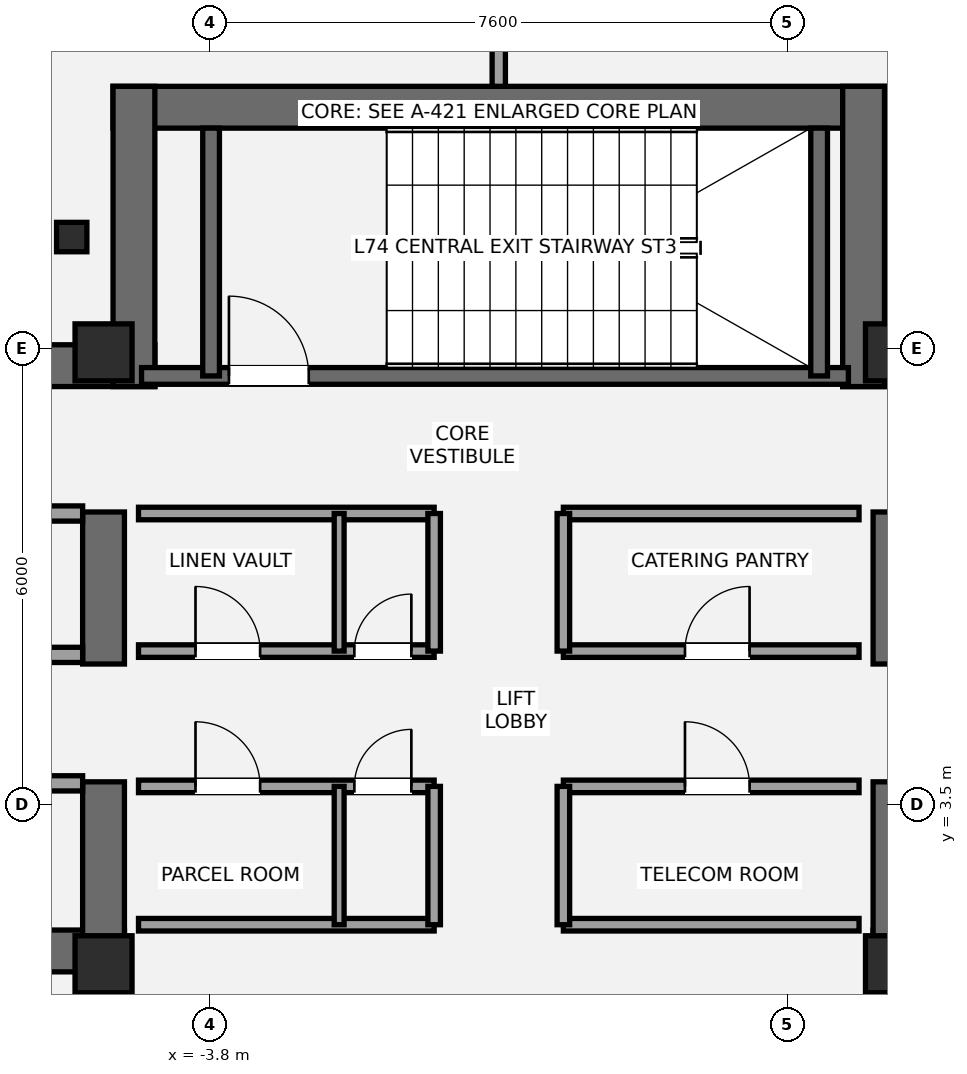
"""IFC4 building model, lengths in metres.
Left out: names, types, materials, properties, quantities, classifications, styles, units other than length and angle.
Written with IfcOpenShell. Run it as: python <this file> out.ifc"""

import sys

from ifc_helpers import new_model, si_unit, direction, frame, frame_2d, origin, origin_2d, place, context, subcontext, project, spatial, rectangle, i_section, extrude, element, fill, save


model = new_model("IFC4")
c1 = context("Model", 3, precision=1e-05, world=origin(), true_north=direction((0.0, 1.0)))
c2 = subcontext(c1, "Body", "Model", "MODEL_VIEW")
j1 = project(units=[si_unit("LENGTHUNIT", "METRE"), si_unit("PLANEANGLEUNIT", "RADIAN")], contexts=[c1])
p1 = place(None, origin())
s1 = spatial("IfcSite", under=j1, at=p1, CompositionType="ELEMENT")
p2 = place(p1, origin())
s2 = spatial("IfcBuilding", under=s1, at=p2, CompositionType="ELEMENT")
p3 = place(p2, frame((0.0, 0.0, 260.4)))
s3 = spatial("IfcBuildingStorey", under=s2, at=p3, CompositionType="ELEMENT", Elevation=260.4)
p4 = place(p3, frame((-13.7, 9.275, 0.0), z_axis=(0.0, 0.0, 1.0), x_axis=(1.0, 0.0, 0.0)))
e1 = element("IfcWall", 1, at=p4, inside=s3, PredefinedType="SHEAR", context=c2, shape_type="SweptSolid", body=[
    extrude(rectangle(XDim=9.175, YDim=0.55, at=frame_2d((4.587, 0.0))), origin(), (0.0, 0.0, 1.0), 4.4),
])
p5 = place(p3, frame((-4.925, 1.575, 0.0), z_axis=(0.0, 0.0, 1.0), x_axis=(-1.0, 0.0, 0.0)))
e2 = element("IfcWall", 2, at=p5, inside=s3, PredefinedType="SHEAR", context=c2, shape_type="SweptSolid", body=[
    extrude(rectangle(XDim=8.775, YDim=0.55, at=frame_2d((4.387, 0.0))), origin(), (0.0, 0.0, 1.0), 4.4),
])
p6 = place(p5, frame((5.375, 0.0, 0.0)))
e3 = element("IfcOpeningElement", 3, at=p6, cuts=e2, PredefinedType="OPENING", context=c2, shape_type="SweptSolid", body=[
    extrude(rectangle(XDim=1.05, YDim=2.15, at=frame_2d((0.525, 1.075))), frame((0.0, 0.285, 0.0), z_axis=(0.0, -1.0, 0.0), x_axis=(1.0, 0.0, 0.0)), (0.0, 0.0, 1.0), 0.57),
])
p7 = place(p5, frame((3.705, 0.0, 0.0)))
e4 = element("IfcOpeningElement", 4, at=p7, cuts=e2, PredefinedType="OPENING", context=c2, shape_type="SweptSolid", body=[
    extrude(rectangle(XDim=1.1, YDim=2.2, at=frame_2d((0.55, 1.1))), frame((0.0, 0.285, 0.0), z_axis=(0.0, -1.0, 0.0), x_axis=(1.0, 0.0, 0.0)), (0.0, 0.0, 1.0), 0.57),
])
p8 = place(p3, frame((-5.2, 1.3, 0.0), z_axis=(0.0, 0.0, 1.0), x_axis=(0.0, 1.0, 0.0)))
e5 = element("IfcWall", 5, at=p8, inside=s3, PredefinedType="SHEAR", context=c2, shape_type="SweptSolid", body=[
    extrude(rectangle(XDim=2.5, YDim=0.55, at=frame_2d((1.25, 0.0))), origin(), (0.0, 0.0, 1.0), 4.4),
])
p9 = place(p3, frame((-5.2, 5.35, 0.0), z_axis=(0.0, 0.0, 1.0), x_axis=(0.0, 1.0, 0.0)))
e6 = element("IfcWall", 6, at=p9, inside=s3, PredefinedType="SHEAR", context=c2, shape_type="SweptSolid", body=[
    extrude(rectangle(XDim=2.0, YDim=0.55, at=frame_2d((1.0, 0.0))), origin(), (0.0, 0.0, 1.0), 4.4),
])
p10 = place(p3, frame((4.525, 9.275, 0.0), z_axis=(0.0, 0.0, 1.0), x_axis=(1.0, 0.0, 0.0)))
e7 = element("IfcWall", 7, at=p10, inside=s3, PredefinedType="SHEAR", context=c2, shape_type="SweptSolid", body=[
    extrude(rectangle(XDim=9.175, YDim=0.55, at=frame_2d((4.587, 0.0))), origin(), (0.0, 0.0, 1.0), 4.4),
])
p11 = place(p3, frame((13.7, 1.575, 0.0), z_axis=(0.0, 0.0, 1.0), x_axis=(-1.0, 0.0, 0.0)))
e8 = element("IfcWall", 8, at=p11, inside=s3, PredefinedType="SHEAR", context=c2, shape_type="SweptSolid", body=[
    extrude(rectangle(XDim=8.775, YDim=0.55, at=frame_2d((4.387, 0.0))), origin(), (0.0, 0.0, 1.0), 4.4),
])
p12 = place(p11, frame((2.35, 0.0, 0.0)))
e9 = element("IfcOpeningElement", 9, at=p12, cuts=e8, PredefinedType="OPENING", context=c2, shape_type="SweptSolid", body=[
    extrude(rectangle(XDim=1.05, YDim=2.15, at=frame_2d((0.525, 1.075))), frame((0.0, 0.285, 0.0), z_axis=(0.0, -1.0, 0.0), x_axis=(1.0, 0.0, 0.0)), (0.0, 0.0, 1.0), 0.57),
])
p13 = place(p11, frame((4.35, 0.0, 0.0)))
e10 = element("IfcOpeningElement", 10, at=p13, cuts=e8, PredefinedType="OPENING", context=c2, shape_type="SweptSolid", body=[
    extrude(rectangle(XDim=1.1, YDim=2.2, at=frame_2d((0.55, 1.1))), frame((0.0, 0.285, 0.0), z_axis=(0.0, -1.0, 0.0), x_axis=(1.0, 0.0, 0.0)), (0.0, 0.0, 1.0), 0.57),
])
p14 = place(p3, frame((5.2, 1.3, 0.0), z_axis=(0.0, 0.0, 1.0), x_axis=(0.0, 1.0, 0.0)))
e11 = element("IfcWall", 11, at=p14, inside=s3, PredefinedType="SHEAR", context=c2, shape_type="SweptSolid", body=[
    extrude(rectangle(XDim=2.5, YDim=0.55, at=frame_2d((1.25, 0.0))), origin(), (0.0, 0.0, 1.0), 4.4),
])
p15 = place(p3, frame((5.2, 5.35, 0.0), z_axis=(0.0, 0.0, 1.0), x_axis=(0.0, 1.0, 0.0)))
e12 = element("IfcWall", 12, at=p15, inside=s3, PredefinedType="SHEAR", context=c2, shape_type="SweptSolid", body=[
    extrude(rectangle(XDim=2.0, YDim=0.55, at=frame_2d((1.0, 0.0))), origin(), (0.0, 0.0, 1.0), 4.4),
])
p16 = place(p3, frame((-5.075, 12.675, 0.0), z_axis=(0.0, 0.0, 1.0), x_axis=(1.0, 0.0, 0.0)))
e13 = element("IfcWall", 13, at=p16, inside=s3, PredefinedType="SHEAR", context=c2, shape_type="SweptSolid", body=[
    extrude(rectangle(XDim=10.15, YDim=0.55, at=frame_2d((5.075, 0.0))), origin(), (0.0, 0.0, 1.0), 4.4),
])
for number, where, z_axis, x_axis in (
    (14, (-4.8, 9.0, 0.0), (0.0, 0.0, 1.0), (0.0, 1.0, 0.0)),
    (15, (4.8, 9.0, 0.0), (0.0, 0.0, 1.0), (0.0, 1.0, 0.0)),
):
    element("IfcWall", number, at=place(p3, frame(where, z_axis=z_axis, x_axis=x_axis)), inside=s3, PredefinedType="SHEAR", context=c2, shape_type="SweptSolid", body=[
        extrude(rectangle(XDim=3.95, YDim=0.55, at=frame_2d((1.975, 0.0))), origin(), (0.0, 0.0, 1.0), 4.4),
    ])
p17 = place(p3, frame((-4.7, 9.14, 0.0), z_axis=(0.0, 0.0, 1.0), x_axis=(1.0, 0.0, 0.0)))
e16 = element("IfcWall", 16, at=p17, inside=s3, PredefinedType="SHEAR", context=c2, shape_type="SweptSolid", body=[
    extrude(rectangle(XDim=9.3, YDim=0.22, at=frame_2d((4.65, 0.0))), origin(), (0.0, 0.0, 1.0), 4.4),
])
p18 = place(p17, frame((1.15, 0.0, 0.0)))
e17 = element("IfcOpeningElement", 17, at=p18, cuts=e16, PredefinedType="OPENING", context=c2, shape_type="SweptSolid", body=[
    extrude(rectangle(XDim=1.05, YDim=2.15, at=frame_2d((0.525, 1.075))), frame((0.0, 0.12, 0.0), z_axis=(0.0, -1.0, 0.0), x_axis=(1.0, 0.0, 0.0)), (0.0, 0.0, 1.0), 0.24),
])
for number, where, z_axis, x_axis in (
    (18, (-3.785, 9.14, 0.0), (0.0, 0.0, 1.0), (0.0, 1.0, 0.0)),
    (19, (4.215, 9.14, 0.0), (0.0, 0.0, 1.0), (0.0, 1.0, 0.0)),
):
    element("IfcWall", number, at=place(p3, frame(where, z_axis=z_axis, x_axis=x_axis)), inside=s3, PredefinedType="SHEAR", context=c2, shape_type="SweptSolid", body=[
        extrude(rectangle(XDim=3.26, YDim=0.22, at=frame_2d((1.63, 0.0))), origin(), (0.0, 0.0, 1.0), 4.4),
    ])
for number, where, z_axis, x_axis in (
    (20, (-5.2, 1.4, 0.0), (0.0, 0.0, 1.0), (1.0, 0.0, 0.0)),
    (21, (-5.2, 9.45, 0.0), (0.0, 0.0, 1.0), (1.0, 0.0, 0.0)),
    (22, (5.2, 1.4, 0.0), (0.0, 0.0, 1.0), (1.0, 0.0, 0.0)),
    (23, (5.2, 9.45, 0.0), (0.0, 0.0, 1.0), (1.0, 0.0, 0.0)),
):
    element("IfcColumn", number, at=place(p3, frame(where, z_axis=z_axis, x_axis=x_axis)), inside=s3, PredefinedType="PILASTER", context=c2, shape_type="SweptSolid", body=[
        extrude(rectangle(XDim=0.75, YDim=0.75, at=origin_2d()), origin(), (0.0, 0.0, 1.0), 4.4),
    ])
p19 = place(p3, frame((-5.619, 10.967, 0.0), z_axis=(0.0, 0.0, 1.0), x_axis=(1.0, 0.0, 0.0)))
e24 = element("IfcColumn", 24, at=p19, inside=s3, PredefinedType="COLUMN", context=c2, shape_type="SweptSolid", body=[
    extrude(i_section(OverallWidth=0.399, OverallDepth=0.387, WebThickness=0.021, FlangeThickness=0.033, at=origin_2d()), origin(), (0.0, 0.0, 1.0), 4.4),
])
p20 = place(p3, frame((-4.95, -2.15, 0.0), z_axis=(0.0, 0.0, 1.0), x_axis=(0.0, 1.0, 0.0)))
e25 = element("IfcWall", 25, at=p20, inside=s3, PredefinedType="SOLIDWALL", context=c2, shape_type="SweptSolid", body=[
    extrude(rectangle(XDim=3.5, YDim=0.2, at=frame_2d((1.75, 0.0))), origin(), (0.0, 0.0, 1.0), 3.633),
])
p21 = place(p20, frame((0.95, 0.0, 0.0)))
e26 = element("IfcOpeningElement", 26, at=p21, cuts=e25, PredefinedType="OPENING", context=c2, shape_type="SweptSolid", body=[
    extrude(rectangle(XDim=0.75, YDim=2.1, at=frame_2d((0.375, 1.05))), frame((0.0, 0.11, 0.0), z_axis=(0.0, -1.0, 0.0), x_axis=(1.0, 0.0, 0.0)), (0.0, 0.0, 1.0), 0.22),
])
p22 = place(p3, frame((4.95, -2.15, 0.0), z_axis=(0.0, 0.0, 1.0), x_axis=(0.0, 1.0, 0.0)))
e27 = element("IfcWall", 27, at=p22, inside=s3, PredefinedType="SOLIDWALL", context=c2, shape_type="SweptSolid", body=[
    extrude(rectangle(XDim=3.5, YDim=0.2, at=frame_2d((1.75, 0.0))), origin(), (0.0, 0.0, 1.0), 2.37),
])
p23 = place(p22, frame((0.95, 0.0, 0.0)))
e28 = element("IfcOpeningElement", 28, at=p23, cuts=e27, PredefinedType="OPENING", context=c2, shape_type="SweptSolid", body=[
    extrude(rectangle(XDim=0.75, YDim=2.1, at=frame_2d((0.375, 1.05))), frame((0.0, 0.11, 0.0), z_axis=(0.0, -1.0, 0.0), x_axis=(1.0, 0.0, 0.0)), (0.0, 0.0, 1.0), 0.22),
])
p24 = place(p3, frame((-9.78, 3.78, 0.0), z_axis=(0.0, 0.0, 1.0), x_axis=(1.0, 0.0, 0.0)))
e29 = element("IfcWall", 29, at=p24, inside=s3, PredefinedType="SOLIDWALL", context=c2, shape_type="SweptSolid", body=[
    extrude(rectangle(XDim=4.305, YDim=0.2, at=frame_2d((2.152, 0.0))), origin(), (0.0, 0.0, 1.0), 4.18),
])
p25 = place(p24, frame((2.78, 0.0, 0.0)))
e30 = element("IfcOpeningElement", 30, at=p25, cuts=e29, PredefinedType="OPENING", context=c2, shape_type="SweptSolid", body=[
    extrude(rectangle(XDim=0.85, YDim=2.1, at=frame_2d((0.425, 1.05))), frame((0.0, 0.11, 0.0), z_axis=(0.0, -1.0, 0.0), x_axis=(1.0, 0.0, 0.0)), (0.0, 0.0, 1.0), 0.22),
])
p26 = place(p3, frame((-9.78, 5.47, 0.0), z_axis=(0.0, 0.0, 1.0), x_axis=(1.0, 0.0, 0.0)))
e31 = element("IfcWall", 31, at=p26, inside=s3, PredefinedType="SOLIDWALL", context=c2, shape_type="SweptSolid", body=[
    extrude(rectangle(XDim=4.305, YDim=0.2, at=frame_2d((2.152, 0.0))), origin(), (0.0, 0.0, 1.0), 4.18),
])
p27 = place(p26, frame((2.78, 0.0, 0.0)))
e32 = element("IfcOpeningElement", 32, at=p27, cuts=e31, PredefinedType="OPENING", context=c2, shape_type="SweptSolid", body=[
    extrude(rectangle(XDim=0.85, YDim=2.1, at=frame_2d((0.425, 1.05))), frame((0.0, 0.11, 0.0), z_axis=(0.0, -1.0, 0.0), x_axis=(1.0, 0.0, 0.0)), (0.0, 0.0, 1.0), 0.22),
])
p28 = place(p3, frame((-9.78, 7.33, 0.0), z_axis=(0.0, 0.0, 1.0), x_axis=(1.0, 0.0, 0.0)))
e33 = element("IfcWall", 33, at=p28, inside=s3, PredefinedType="SOLIDWALL", context=c2, shape_type="SweptSolid", body=[
    extrude(rectangle(XDim=4.305, YDim=0.2, at=frame_2d((2.152, 0.0))), origin(), (0.0, 0.0, 1.0), 4.18),
])
p29 = place(p3, frame((-4.74, 1.92, 0.0), z_axis=(0.0, 0.0, 1.0), x_axis=(1.0, 0.0, 0.0)))
e34 = element("IfcWall", 34, at=p29, inside=s3, PredefinedType="PARTITIONING", context=c2, shape_type="SweptSolid", body=[
    extrude(rectangle(XDim=3.89, YDim=0.165, at=frame_2d((1.945, 0.0))), origin(), (0.0, 0.0, 1.0), 3.32),
])
p30 = place(p3, frame((-4.74, 3.74, 0.0), z_axis=(0.0, 0.0, 1.0), x_axis=(1.0, 0.0, 0.0)))
e35 = element("IfcWall", 35, at=p30, inside=s3, PredefinedType="PARTITIONING", context=c2, shape_type="SweptSolid", body=[
    extrude(rectangle(XDim=3.89, YDim=0.165, at=frame_2d((1.945, 0.0))), origin(), (0.0, 0.0, 1.0), 4.18),
])
p31 = place(p30, frame((0.75, 0.0, 0.0)))
e36 = element("IfcOpeningElement", 36, at=p31, cuts=e35, PredefinedType="OPENING", context=c2, shape_type="SweptSolid", body=[
    extrude(rectangle(XDim=0.85, YDim=2.1, at=frame_2d((0.425, 1.05))), frame((0.0, 0.093, 0.0), z_axis=(0.0, -1.0, 0.0), x_axis=(1.0, 0.0, 0.0)), (0.0, 0.0, 1.0), 0.185),
])
p32 = place(p30, frame((2.84, 0.0, 0.0)))
e37 = element("IfcOpeningElement", 37, at=p32, cuts=e35, PredefinedType="OPENING", context=c2, shape_type="SweptSolid", body=[
    extrude(rectangle(XDim=0.75, YDim=2.1, at=frame_2d((0.375, 1.05))), frame((0.0, 0.093, 0.0), z_axis=(0.0, -1.0, 0.0), x_axis=(1.0, 0.0, 0.0)), (0.0, 0.0, 1.0), 0.185),
])
p33 = place(p3, frame((-0.85, 1.92, 0.0), z_axis=(0.0, 0.0, 1.0), x_axis=(0.0, 1.0, 0.0)))
e38 = element("IfcWall", 38, at=p33, inside=s3, PredefinedType="PARTITIONING", context=c2, shape_type="SweptSolid", body=[
    extrude(rectangle(XDim=1.82, YDim=0.165, at=frame_2d((0.91, 0.0))), origin(), (0.0, 0.0, 1.0), 4.18),
])
p34 = place(p3, frame((0.85, 1.92, 0.0), z_axis=(0.0, 0.0, 1.0), x_axis=(1.0, 0.0, 0.0)))
e39 = element("IfcWall", 39, at=p34, inside=s3, PredefinedType="PARTITIONING", context=c2, shape_type="SweptSolid", body=[
    extrude(rectangle(XDim=3.89, YDim=0.165, at=frame_2d((1.945, 0.0))), origin(), (0.0, 0.0, 1.0), 3.32),
])
p35 = place(p3, frame((0.85, 3.74, 0.0), z_axis=(0.0, 0.0, 1.0), x_axis=(1.0, 0.0, 0.0)))
e40 = element("IfcWall", 40, at=p35, inside=s3, PredefinedType="PARTITIONING", context=c2, shape_type="SweptSolid", body=[
    extrude(rectangle(XDim=3.89, YDim=0.165, at=frame_2d((1.945, 0.0))), origin(), (0.0, 0.0, 1.0), 4.18),
])
p36 = place(p35, frame((1.6, 0.0, 0.0)))
e41 = element("IfcOpeningElement", 41, at=p36, cuts=e40, PredefinedType="OPENING", context=c2, shape_type="SweptSolid", body=[
    extrude(rectangle(XDim=0.85, YDim=2.1, at=frame_2d((0.425, 1.05))), frame((0.0, 0.093, 0.0), z_axis=(0.0, -1.0, 0.0), x_axis=(1.0, 0.0, 0.0)), (0.0, 0.0, 1.0), 0.185),
])
p37 = place(p3, frame((0.85, 1.92, 0.0), z_axis=(0.0, 0.0, 1.0), x_axis=(0.0, 1.0, 0.0)))
e42 = element("IfcWall", 42, at=p37, inside=s3, PredefinedType="PARTITIONING", context=c2, shape_type="SweptSolid", body=[
    extrude(rectangle(XDim=1.82, YDim=0.165, at=frame_2d((0.91, 0.0))), origin(), (0.0, 0.0, 1.0), 4.18),
])
p38 = place(p3, frame((-2.1, 1.92, 0.0), z_axis=(0.0, 0.0, 1.0), x_axis=(0.0, 1.0, 0.0)))
e43 = element("IfcWall", 43, at=p38, inside=s3, PredefinedType="PARTITIONING", context=c2, shape_type="SweptSolid", body=[
    extrude(rectangle(XDim=1.82, YDim=0.13, at=frame_2d((0.91, 0.0))), origin(), (0.0, 0.0, 1.0), 4.18),
])
p39 = place(p3, frame((-4.74, 5.52, 0.0), z_axis=(0.0, 0.0, 1.0), x_axis=(1.0, 0.0, 0.0)))
e44 = element("IfcWall", 44, at=p39, inside=s3, PredefinedType="PARTITIONING", context=c2, shape_type="SweptSolid", body=[
    extrude(rectangle(XDim=3.89, YDim=0.165, at=frame_2d((1.945, 0.0))), origin(), (0.0, 0.0, 1.0), 4.18),
])
p40 = place(p39, frame((0.75, 0.0, 0.0)))
e45 = element("IfcOpeningElement", 45, at=p40, cuts=e44, PredefinedType="OPENING", context=c2, shape_type="SweptSolid", body=[
    extrude(rectangle(XDim=0.85, YDim=2.1, at=frame_2d((0.425, 1.05))), frame((0.0, 0.093, 0.0), z_axis=(0.0, -1.0, 0.0), x_axis=(1.0, 0.0, 0.0)), (0.0, 0.0, 1.0), 0.185),
])
p41 = place(p39, frame((2.84, 0.0, 0.0)))
e46 = element("IfcOpeningElement", 46, at=p41, cuts=e44, PredefinedType="OPENING", context=c2, shape_type="SweptSolid", body=[
    extrude(rectangle(XDim=0.75, YDim=2.1, at=frame_2d((0.375, 1.05))), frame((0.0, 0.093, 0.0), z_axis=(0.0, -1.0, 0.0), x_axis=(1.0, 0.0, 0.0)), (0.0, 0.0, 1.0), 0.185),
])
p42 = place(p3, frame((-4.74, 7.33, 0.0), z_axis=(0.0, 0.0, 1.0), x_axis=(1.0, 0.0, 0.0)))
e47 = element("IfcWall", 47, at=p42, inside=s3, PredefinedType="PARTITIONING", context=c2, shape_type="SweptSolid", body=[
    extrude(rectangle(XDim=3.89, YDim=0.165, at=frame_2d((1.945, 0.0))), origin(), (0.0, 0.0, 1.0), 4.18),
])
p43 = place(p3, frame((-0.85, 5.52, 0.0), z_axis=(0.0, 0.0, 1.0), x_axis=(0.0, 1.0, 0.0)))
e48 = element("IfcWall", 48, at=p43, inside=s3, PredefinedType="PARTITIONING", context=c2, shape_type="SweptSolid", body=[
    extrude(rectangle(XDim=1.81, YDim=0.165, at=frame_2d((0.905, 0.0))), origin(), (0.0, 0.0, 1.0), 4.18),
])
p44 = place(p3, frame((0.85, 5.52, 0.0), z_axis=(0.0, 0.0, 1.0), x_axis=(1.0, 0.0, 0.0)))
e49 = element("IfcWall", 49, at=p44, inside=s3, PredefinedType="PARTITIONING", context=c2, shape_type="SweptSolid", body=[
    extrude(rectangle(XDim=3.89, YDim=0.165, at=frame_2d((1.945, 0.0))), origin(), (0.0, 0.0, 1.0), 4.18),
])
p45 = place(p44, frame((1.6, 0.0, 0.0)))
e50 = element("IfcOpeningElement", 50, at=p45, cuts=e49, PredefinedType="OPENING", context=c2, shape_type="SweptSolid", body=[
    extrude(rectangle(XDim=0.85, YDim=2.1, at=frame_2d((0.425, 1.05))), frame((0.0, 0.093, 0.0), z_axis=(0.0, -1.0, 0.0), x_axis=(1.0, 0.0, 0.0)), (0.0, 0.0, 1.0), 0.185),
])
p46 = place(p3, frame((0.85, 7.33, 0.0), z_axis=(0.0, 0.0, 1.0), x_axis=(1.0, 0.0, 0.0)))
e51 = element("IfcWall", 51, at=p46, inside=s3, PredefinedType="PARTITIONING", context=c2, shape_type="SweptSolid", body=[
    extrude(rectangle(XDim=3.89, YDim=0.165, at=frame_2d((1.945, 0.0))), origin(), (0.0, 0.0, 1.0), 4.18),
])
p47 = place(p3, frame((0.85, 5.52, 0.0), z_axis=(0.0, 0.0, 1.0), x_axis=(0.0, 1.0, 0.0)))
e52 = element("IfcWall", 52, at=p47, inside=s3, PredefinedType="PARTITIONING", context=c2, shape_type="SweptSolid", body=[
    extrude(rectangle(XDim=1.81, YDim=0.165, at=frame_2d((0.905, 0.0))), origin(), (0.0, 0.0, 1.0), 4.18),
])
p48 = place(p3, frame((-2.1, 5.52, 0.0), z_axis=(0.0, 0.0, 1.0), x_axis=(0.0, 1.0, 0.0)))
e53 = element("IfcWall", 53, at=p48, inside=s3, PredefinedType="PARTITIONING", context=c2, shape_type="SweptSolid", body=[
    extrude(rectangle(XDim=1.81, YDim=0.13, at=frame_2d((0.905, 0.0))), origin(), (0.0, 0.0, 1.0), 4.18),
])
p49 = place(p3, frame((0.0, 12.95, 0.0), z_axis=(0.0, 0.0, 1.0), x_axis=(0.0, 1.0, 0.0)))
e54 = element("IfcWall", 54, at=p49, inside=s3, PredefinedType="PARTITIONING", context=c2, shape_type="SweptSolid", body=[
    extrude(rectangle(XDim=0.861, YDim=0.175, at=frame_2d((0.431, 0.0))), origin(), (0.0, 0.0, 1.0), 4.18),
])
p50 = place(p18, origin())
e55 = element("IfcDoor", 55, at=p50, inside=s3, OperationType="SINGLE_SWING_LEFT", PredefinedType="DOOR", context=c2, shape_type="SweptSolid", body=[
    extrude(rectangle(XDim=1.05, YDim=2.15, at=frame_2d((0.525, 1.075))), frame((0.0, 0.025, 0.0), z_axis=(0.0, -1.0, 0.0), x_axis=(1.0, 0.0, 0.0)), (0.0, 0.0, 1.0), 0.05),
])
fill(e17, e55)
p51 = place(p31, origin())
e56 = element("IfcDoor", 56, at=p51, inside=s3, OperationType="SINGLE_SWING_LEFT", PredefinedType="DOOR", context=c2, shape_type="SweptSolid", body=[
    extrude(rectangle(XDim=0.85, YDim=2.1, at=frame_2d((0.425, 1.05))), frame((0.0, 0.025, 0.0), z_axis=(0.0, -1.0, 0.0), x_axis=(1.0, 0.0, 0.0)), (0.0, 0.0, 1.0), 0.05),
])
fill(e36, e56)
p52 = place(p32, origin())
e57 = element("IfcDoor", 57, at=p52, inside=s3, OperationType="SINGLE_SWING_RIGHT", PredefinedType="DOOR", context=c2, shape_type="SweptSolid", body=[
    extrude(rectangle(XDim=0.75, YDim=2.1, at=frame_2d((0.375, 1.05))), frame((0.0, 0.025, 0.0), z_axis=(0.0, -1.0, 0.0), x_axis=(1.0, 0.0, 0.0)), (0.0, 0.0, 1.0), 0.05),
])
fill(e37, e57)
p53 = place(p36, origin())
e58 = element("IfcDoor", 58, at=p53, inside=s3, OperationType="SINGLE_SWING_LEFT", PredefinedType="DOOR", context=c2, shape_type="SweptSolid", body=[
    extrude(rectangle(XDim=0.85, YDim=2.1, at=frame_2d((0.425, 1.05))), frame((0.0, 0.025, 0.0), z_axis=(0.0, -1.0, 0.0), x_axis=(1.0, 0.0, 0.0)), (0.0, 0.0, 1.0), 0.05),
])
fill(e41, e58)
p54 = place(p40, origin())
e59 = element("IfcDoor", 59, at=p54, inside=s3, OperationType="SINGLE_SWING_LEFT", PredefinedType="DOOR", context=c2, shape_type="SweptSolid", body=[
    extrude(rectangle(XDim=0.85, YDim=2.1, at=frame_2d((0.425, 1.05))), frame((0.0, 0.025, 0.0), z_axis=(0.0, -1.0, 0.0), x_axis=(1.0, 0.0, 0.0)), (0.0, 0.0, 1.0), 0.05),
])
fill(e45, e59)
p55 = place(p41, origin())
e60 = element("IfcDoor", 60, at=p55, inside=s3, OperationType="SINGLE_SWING_RIGHT", PredefinedType="DOOR", context=c2, shape_type="SweptSolid", body=[
    extrude(rectangle(XDim=0.75, YDim=2.1, at=frame_2d((0.375, 1.05))), frame((0.0, 0.025, 0.0), z_axis=(0.0, -1.0, 0.0), x_axis=(1.0, 0.0, 0.0)), (0.0, 0.0, 1.0), 0.05),
])
fill(e46, e60)
p56 = place(p45, origin())
e61 = element("IfcDoor", 61, at=p56, inside=s3, OperationType="SINGLE_SWING_RIGHT", PredefinedType="DOOR", context=c2, shape_type="SweptSolid", body=[
    extrude(rectangle(XDim=0.85, YDim=2.1, at=frame_2d((0.425, 1.05))), frame((0.0, 0.025, 0.0), z_axis=(0.0, -1.0, 0.0), x_axis=(1.0, 0.0, 0.0)), (0.0, 0.0, 1.0), 0.05),
])
fill(e50, e61)
save(model, sys.argv[1])
